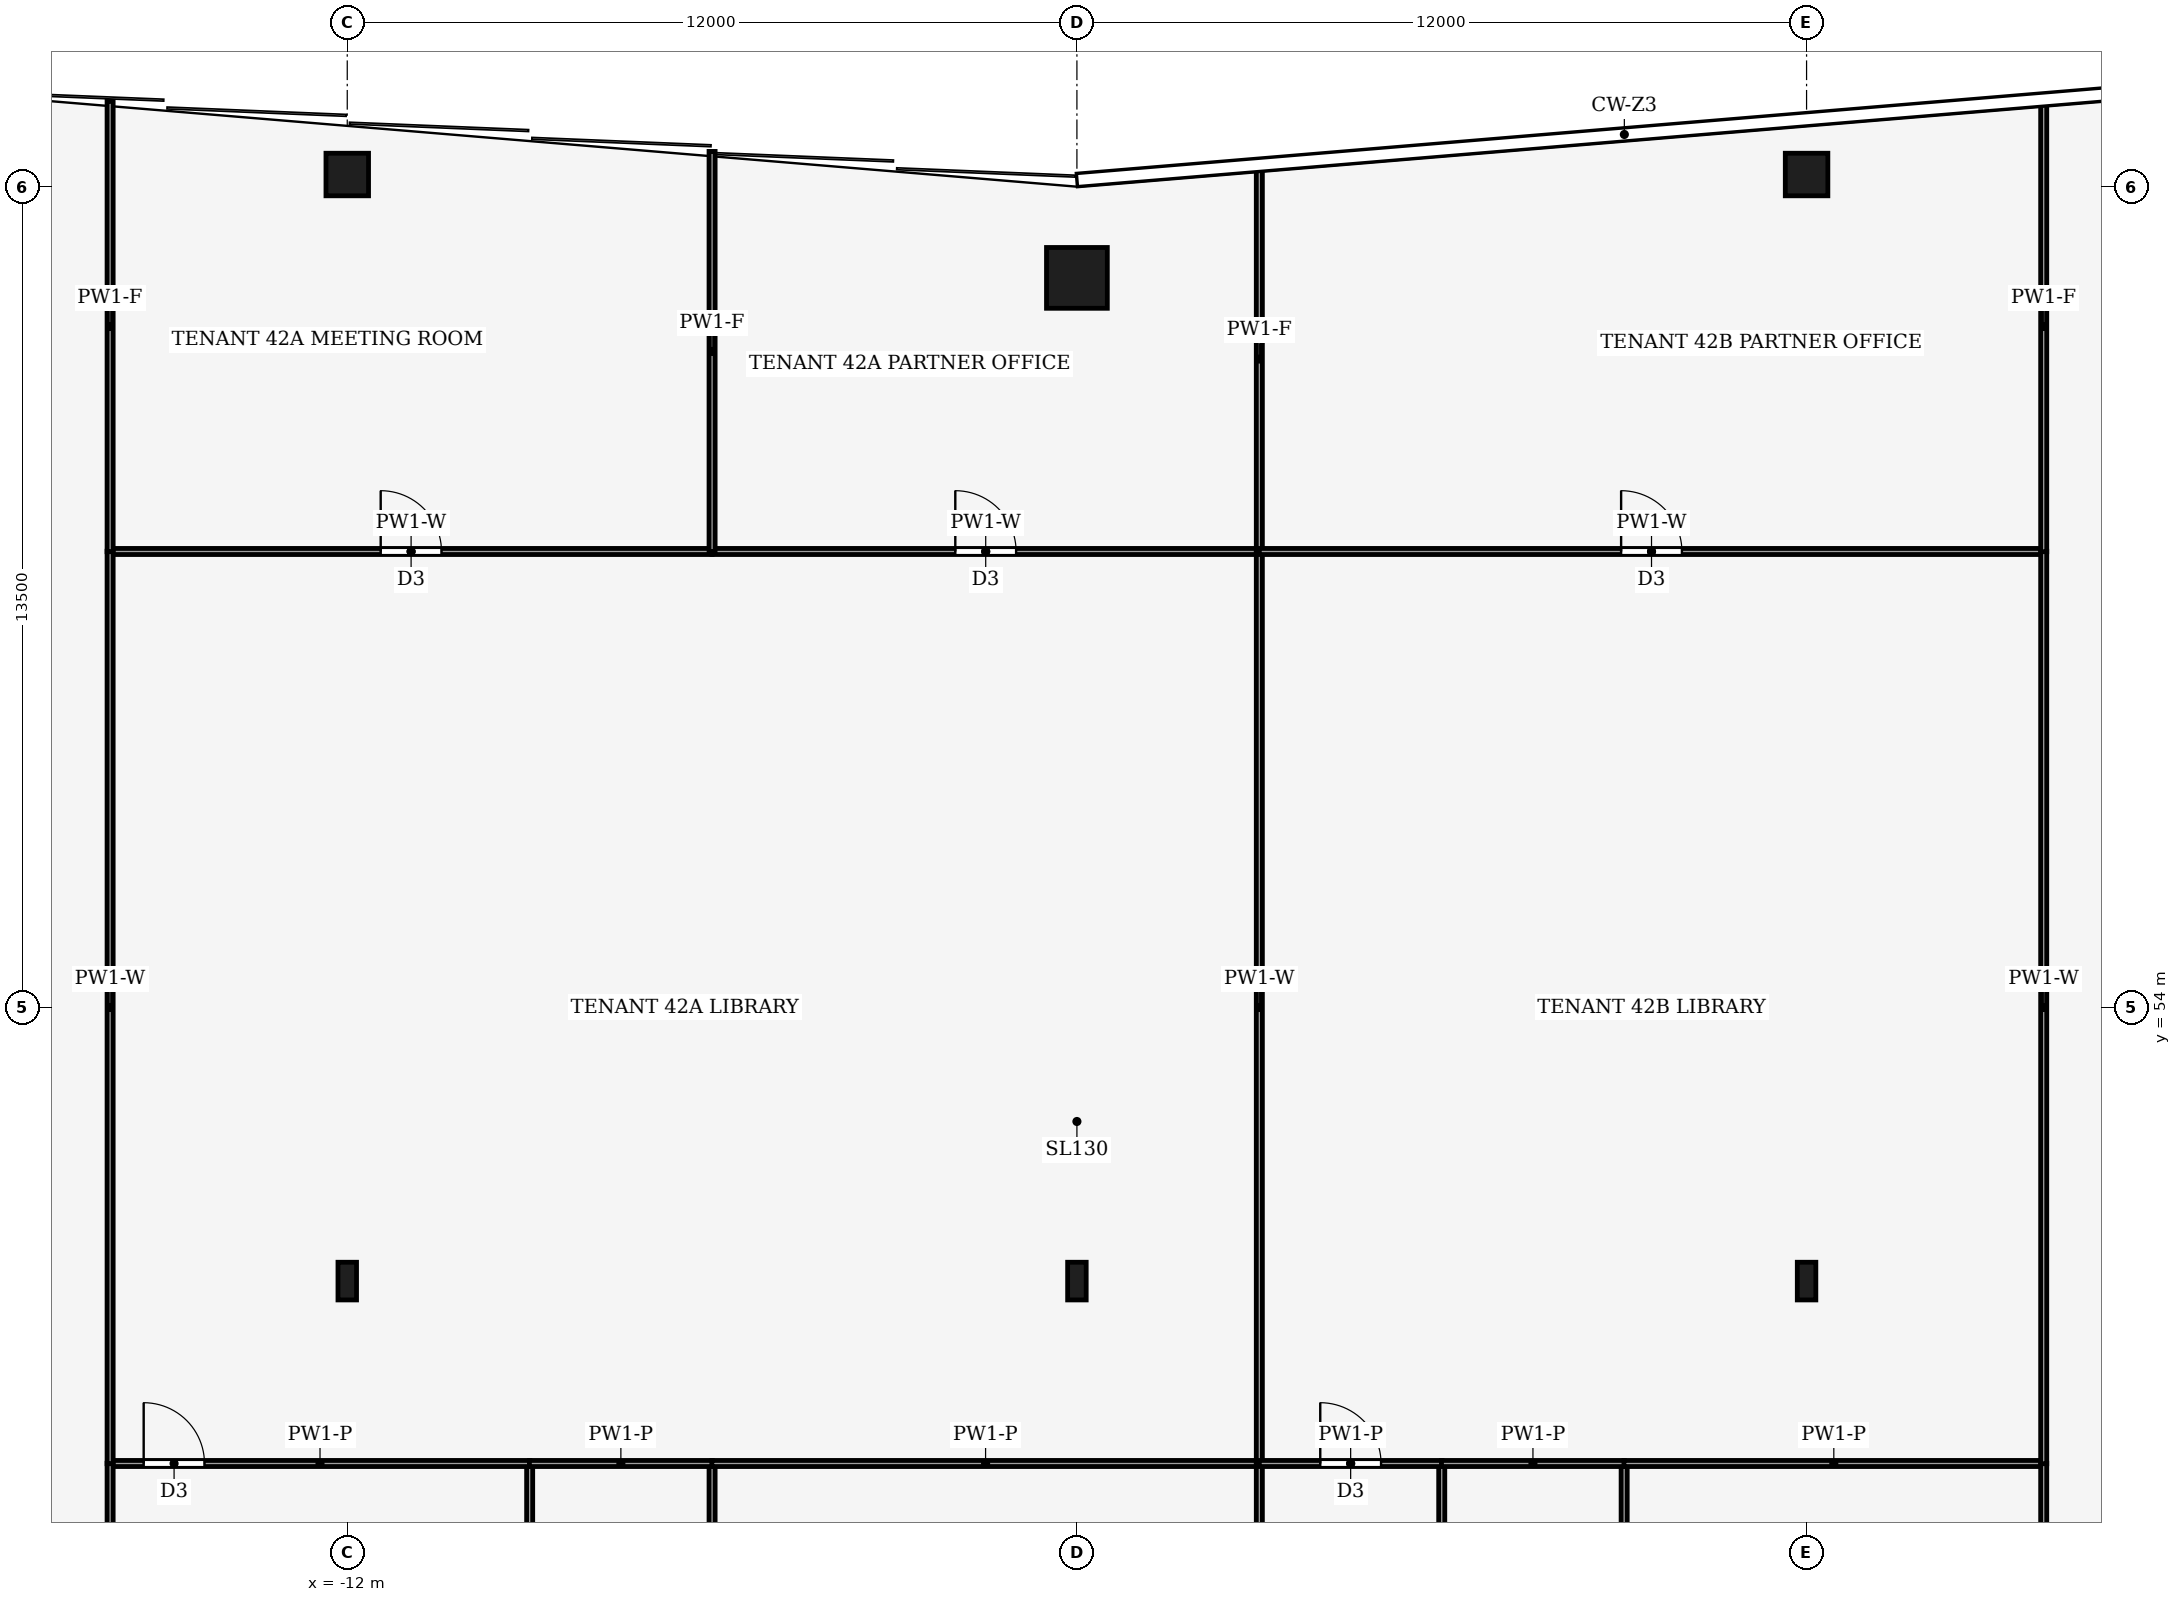
"""IFC4 building model, lengths in metres.
Left out: names, types, materials, properties, quantities, classifications, styles, units other than length and angle.
Written with IfcOpenShell. Run it as: python <this file> out.ifc"""

import sys

from ifc_helpers import new_model, si_unit, direction, frame, frame_2d, origin, origin_2d, place, context, subcontext, project, spatial, rectangle, hollow_rectangle, i_section, extrude, element, fill, save


model = new_model("IFC4")
c1 = context("Model", 3, precision=1e-05, world=origin(), true_north=direction((0.0, 1.0)))
c2 = subcontext(c1, "Body", "Model", "MODEL_VIEW")
j1 = project(units=[si_unit("LENGTHUNIT", "METRE"), si_unit("PLANEANGLEUNIT", "RADIAN")], contexts=[c1])
p1 = place(None, origin())
s1 = spatial("IfcSite", under=j1, at=p1, CompositionType="ELEMENT")
p2 = place(p1, origin())
s2 = spatial("IfcBuilding", under=s1, at=p2, CompositionType="ELEMENT")
p3 = place(p2, frame((0.0, 0.0, 186.0)))
s3 = spatial("IfcBuildingStorey", under=s2, at=p3, CompositionType="ELEMENT", Elevation=186.0)
p4 = place(p3, frame((0.0, 66.0, 0.0), z_axis=(0.0, 0.0, 1.0), x_axis=(1.0, 0.0, 0.0)))
e1 = element("IfcColumn", 1, at=p4, inside=s3, PredefinedType="COLUMN", context=c2, shape_type="SweptSolid", body=[
    extrude(hollow_rectangle(XDim=1.0, YDim=1.0, WallThickness=0.06, at=origin_2d()), origin(), (0.0, 0.0, 1.0), 4.0),
])
for number, where, z_axis, x_axis in (
    (2, (-12.0, 67.7, 0.0), (0.0, 0.0, 1.0), (1.0, 0.0, 0.0)),
    (3, (12.0, 67.7, 0.0), (0.0, 0.0, 1.0), (1.0, 0.0, 0.0)),
):
    element("IfcColumn", number, at=place(p3, frame(where, z_axis=z_axis, x_axis=x_axis)), inside=s3, PredefinedType="COLUMN", context=c2, shape_type="SweptSolid", body=[
        extrude(hollow_rectangle(XDim=0.7, YDim=0.7, WallThickness=0.03, at=origin_2d()), origin(), (0.0, 0.0, 1.0), 4.0),
    ])
for number, where, z_axis, x_axis in (
    (4, (-12.0, 49.5, 0.0), (0.0, 0.0, 1.0), (1.0, 0.0, 0.0)),
    (5, (0.0, 49.5, 0.0), (0.0, 0.0, 1.0), (1.0, 0.0, 0.0)),
    (6, (12.0, 49.5, 0.0), (0.0, 0.0, 1.0), (1.0, 0.0, 0.0)),
):
    element("IfcColumn", number, at=place(p3, frame(where, z_axis=z_axis, x_axis=x_axis)), inside=s3, PredefinedType="COLUMN", context=c2, shape_type="SweptSolid", body=[
        extrude(i_section(OverallWidth=0.305, OverallDepth=0.62, WebThickness=0.021, FlangeThickness=0.04, FilletRadius=0.027, at=origin_2d()), origin(), (0.0, 0.0, 1.0), 4.0),
    ])
p5 = place(p3, frame((-9.0, 46.5, 0.0), z_axis=(0.0, 0.0, 1.0), x_axis=(0.0, -1.0, 0.0)))
e7 = element("IfcWall", 7, at=p5, inside=s3, PredefinedType="PARTITIONING", context=c2, shape_type="SweptSolid", body=[
    extrude(rectangle(XDim=5.6, YDim=0.1, at=frame_2d((2.8, 0.0))), origin(), (0.0, 0.0, 1.0), 3.87),
])
p6 = place(p5, frame((2.3, 0.0, 0.0)))
e8 = element("IfcOpeningElement", 8, at=p6, cuts=e7, PredefinedType="OPENING", context=c2, shape_type="SweptSolid", body=[
    extrude(rectangle(XDim=1.0, YDim=2.1, at=frame_2d((0.5, 1.05))), frame((0.0, 0.06, 0.0), z_axis=(0.0, -1.0, 0.0), x_axis=(1.0, 0.0, 0.0)), (0.0, 0.0, 1.0), 0.12),
])
p7 = place(p3, frame((-15.9, 46.5, 0.0), z_axis=(0.0, 0.0, 1.0), x_axis=(1.0, 0.0, 0.0)))
e9 = element("IfcWall", 9, at=p7, inside=s3, PredefinedType="PARTITIONING", context=c2, shape_type="SweptSolid", body=[
    extrude(rectangle(XDim=6.904, YDim=0.1, at=frame_2d((3.452, 0.0))), origin(), (0.0, 0.0, 1.0), 3.44),
])
p8 = place(p7, frame((0.552, 0.0, 0.0)))
e10 = element("IfcOpeningElement", 10, at=p8, cuts=e9, PredefinedType="OPENING", context=c2, shape_type="SweptSolid", body=[
    extrude(rectangle(XDim=1.0, YDim=2.1, at=frame_2d((0.5, 1.05))), frame((0.0, 0.06, 0.0), z_axis=(0.0, -1.0, 0.0), x_axis=(1.0, 0.0, 0.0)), (0.0, 0.0, 1.0), 0.12),
])
p9 = place(p3, frame((-15.9, 46.504, 0.0), z_axis=(0.0, 0.0, 1.0), x_axis=(0.0, -1.0, 0.0)))
e11 = element("IfcWall", 11, at=p9, inside=s3, PredefinedType="PARTITIONING", context=c2, shape_type="SweptSolid", body=[
    extrude(rectangle(XDim=5.608, YDim=0.1, at=frame_2d((2.804, 0.0))), origin(), (0.0, 0.0, 1.0), 3.44),
])
p10 = place(p3, frame((-6.0, 40.9, 0.0), z_axis=(0.0, 0.0, 1.0), x_axis=(0.0, 1.0, 0.0)))
e12 = element("IfcWall", 12, at=p10, inside=s3, PredefinedType="PARTITIONING", context=c2, shape_type="SweptSolid", body=[
    extrude(rectangle(XDim=5.6, YDim=0.1, at=frame_2d((2.8, 0.0))), origin(), (0.0, 0.0, 1.0), 3.87),
])
p11 = place(p3, frame((-5.996, 46.5, 0.0), z_axis=(0.0, 0.0, 1.0), x_axis=(-1.0, 0.0, 0.0)))
e13 = element("IfcWall", 13, at=p11, inside=s3, PredefinedType="PARTITIONING", context=c2, shape_type="SweptSolid", body=[
    extrude(rectangle(XDim=3.008, YDim=0.1, at=frame_2d((1.504, 0.0))), origin(), (0.0, 0.0, 1.0), 3.44),
])
p12 = place(p3, frame((3.0, 46.5, 0.0), z_axis=(0.0, 0.0, 1.0), x_axis=(-1.0, 0.0, 0.0)))
e14 = element("IfcWall", 14, at=p12, inside=s3, PredefinedType="PARTITIONING", context=c2, shape_type="SweptSolid", body=[
    extrude(rectangle(XDim=9.004, YDim=0.1, at=frame_2d((4.502, 0.0))), origin(), (0.0, 0.0, 1.0), 3.44),
])
p13 = place(p3, frame((3.0, 40.9, 0.0), z_axis=(0.0, 0.0, 1.0), x_axis=(0.0, 1.0, 0.0)))
e15 = element("IfcWall", 15, at=p13, inside=s3, PredefinedType="PARTITIONING", context=c2, shape_type="SweptSolid", body=[
    extrude(rectangle(XDim=5.6, YDim=0.1, at=frame_2d((2.8, 0.0))), origin(), (0.0, 0.0, 1.0), 3.87),
])
p14 = place(p3, frame((-15.9, 61.5, 0.0), z_axis=(0.0, 0.0, 1.0), x_axis=(1.0, 0.0, 0.0)))
e16 = element("IfcWall", 16, at=p14, inside=s3, PredefinedType="PARTITIONING", context=c2, shape_type="SweptSolid", body=[
    extrude(rectangle(XDim=9.9, YDim=0.1, at=frame_2d((4.95, 0.0))), origin(), (0.0, 0.0, 1.0), 3.24),
])
p15 = place(p14, frame((4.45, 0.0, 0.0)))
e17 = element("IfcOpeningElement", 17, at=p15, cuts=e16, PredefinedType="OPENING", context=c2, shape_type="SweptSolid", body=[
    extrude(rectangle(XDim=1.0, YDim=2.1, at=frame_2d((0.5, 1.05))), frame((0.0, 0.06, 0.0), z_axis=(0.0, -1.0, 0.0), x_axis=(1.0, 0.0, 0.0)), (0.0, 0.0, 1.0), 0.12),
])
p16 = place(p3, frame((-6.0, 61.5, 0.0), z_axis=(0.0, 0.0, 1.0), x_axis=(1.0, 0.0, 0.0)))
e18 = element("IfcWall", 18, at=p16, inside=s3, PredefinedType="PARTITIONING", context=c2, shape_type="SweptSolid", body=[
    extrude(rectangle(XDim=9.0, YDim=0.1, at=frame_2d((4.5, 0.0))), origin(), (0.0, 0.0, 1.0), 3.24),
])
p17 = place(p16, frame((4.0, 0.0, 0.0)))
e19 = element("IfcOpeningElement", 19, at=p17, cuts=e18, PredefinedType="OPENING", context=c2, shape_type="SweptSolid", body=[
    extrude(rectangle(XDim=1.0, YDim=2.1, at=frame_2d((0.5, 1.05))), frame((0.0, 0.06, 0.0), z_axis=(0.0, -1.0, 0.0), x_axis=(1.0, 0.0, 0.0)), (0.0, 0.0, 1.0), 0.12),
])
p18 = place(p3, frame((3.0, 46.5, 0.0), z_axis=(0.0, 0.0, 1.0), x_axis=(0.0, 1.0, 0.0)))
e20 = element("IfcWall", 20, at=p18, inside=s3, PredefinedType="PARTITIONING", context=c2, shape_type="SweptSolid", body=[
    extrude(rectangle(XDim=15.0, YDim=0.1, at=frame_2d((7.5, 0.0))), origin(), (0.0, 0.0, 1.0), 3.24),
])
p19 = place(p3, frame((-15.9, 61.504, 0.0), z_axis=(0.0, 0.0, 1.0), x_axis=(0.0, -1.0, 0.0)))
e21 = element("IfcWall", 21, at=p19, inside=s3, PredefinedType="PARTITIONING", context=c2, shape_type="SweptSolid", body=[
    extrude(rectangle(XDim=15.008, YDim=0.1, at=frame_2d((7.504, 0.0))), origin(), (0.0, 0.0, 1.0), 3.24),
])
p20 = place(p3, frame((-6.0, 61.5, 0.0), z_axis=(0.0, 0.0, 1.0), x_axis=(0.0, 1.0, 0.0)))
e22 = element("IfcWall", 22, at=p20, inside=s3, PredefinedType="PARTITIONING", context=c2, shape_type="SweptSolid", body=[
    extrude(rectangle(XDim=6.58, YDim=0.1, at=frame_2d((3.29, 0.0))), origin(), (0.0, 0.0, 1.0), 3.04),
])
p21 = place(p3, frame((-15.9, 68.905, 0.0), z_axis=(0.0, 0.0, 1.0), x_axis=(0.0, -1.0, 0.0)))
e23 = element("IfcWall", 23, at=p21, inside=s3, PredefinedType="PARTITIONING", context=c2, shape_type="SweptSolid", body=[
    extrude(rectangle(XDim=7.409, YDim=0.1, at=frame_2d((3.705, 0.0))), origin(), (0.0, 0.0, 1.0), 3.04),
])
p22 = place(p3, frame((3.0, 61.5, 0.0), z_axis=(0.0, 0.0, 1.0), x_axis=(0.0, 1.0, 0.0)))
e24 = element("IfcWall", 24, at=p22, inside=s3, PredefinedType="PARTITIONING", context=c2, shape_type="SweptSolid", body=[
    extrude(rectangle(XDim=6.33, YDim=0.1, at=frame_2d((3.165, 0.0))), origin(), (0.0, 0.0, 1.0), 3.04),
])
p23 = place(p3, frame((6.0, 46.5, 0.0), z_axis=(0.0, 0.0, 1.0), x_axis=(0.0, -1.0, 0.0)))
e25 = element("IfcWall", 25, at=p23, inside=s3, PredefinedType="PARTITIONING", context=c2, shape_type="SweptSolid", body=[
    extrude(rectangle(XDim=5.6, YDim=0.1, at=frame_2d((2.8, 0.0))), origin(), (0.0, 0.0, 1.0), 3.87),
])
p24 = place(p23, frame((2.3, 0.0, 0.0)))
e26 = element("IfcOpeningElement", 26, at=p24, cuts=e25, PredefinedType="OPENING", context=c2, shape_type="SweptSolid", body=[
    extrude(rectangle(XDim=1.0, YDim=2.1, at=frame_2d((0.5, 1.05))), frame((0.0, 0.06, 0.0), z_axis=(0.0, -1.0, 0.0), x_axis=(1.0, 0.0, 0.0)), (0.0, 0.0, 1.0), 0.12),
])
p25 = place(p3, frame((3.0, 46.5, 0.0), z_axis=(0.0, 0.0, 1.0), x_axis=(1.0, 0.0, 0.0)))
e27 = element("IfcWall", 27, at=p25, inside=s3, PredefinedType="PARTITIONING", context=c2, shape_type="SweptSolid", body=[
    extrude(rectangle(XDim=3.004, YDim=0.1, at=frame_2d((1.502, 0.0))), origin(), (0.0, 0.0, 1.0), 3.44),
])
p26 = place(p25, frame((1.002, 0.0, 0.0)))
e28 = element("IfcOpeningElement", 28, at=p26, cuts=e27, PredefinedType="OPENING", context=c2, shape_type="SweptSolid", body=[
    extrude(rectangle(XDim=1.0, YDim=2.1, at=frame_2d((0.5, 1.05))), frame((0.0, 0.06, 0.0), z_axis=(0.0, -1.0, 0.0), x_axis=(1.0, 0.0, 0.0)), (0.0, 0.0, 1.0), 0.12),
])
p27 = place(p3, frame((9.0, 40.9, 0.0), z_axis=(0.0, 0.0, 1.0), x_axis=(0.0, 1.0, 0.0)))
e29 = element("IfcWall", 29, at=p27, inside=s3, PredefinedType="PARTITIONING", context=c2, shape_type="SweptSolid", body=[
    extrude(rectangle(XDim=5.6, YDim=0.1, at=frame_2d((2.8, 0.0))), origin(), (0.0, 0.0, 1.0), 3.87),
])
p28 = place(p3, frame((9.004, 46.5, 0.0), z_axis=(0.0, 0.0, 1.0), x_axis=(-1.0, 0.0, 0.0)))
e30 = element("IfcWall", 30, at=p28, inside=s3, PredefinedType="PARTITIONING", context=c2, shape_type="SweptSolid", body=[
    extrude(rectangle(XDim=3.008, YDim=0.1, at=frame_2d((1.504, 0.0))), origin(), (0.0, 0.0, 1.0), 3.44),
])
p29 = place(p3, frame((15.9, 46.5, 0.0), z_axis=(0.0, 0.0, 1.0), x_axis=(-1.0, 0.0, 0.0)))
e31 = element("IfcWall", 31, at=p29, inside=s3, PredefinedType="PARTITIONING", context=c2, shape_type="SweptSolid", body=[
    extrude(rectangle(XDim=6.904, YDim=0.1, at=frame_2d((3.452, 0.0))), origin(), (0.0, 0.0, 1.0), 3.44),
])
p30 = place(p3, frame((15.9, 40.896, 0.0), z_axis=(0.0, 0.0, 1.0), x_axis=(0.0, 1.0, 0.0)))
e32 = element("IfcWall", 32, at=p30, inside=s3, PredefinedType="PARTITIONING", context=c2, shape_type="SweptSolid", body=[
    extrude(rectangle(XDim=5.608, YDim=0.1, at=frame_2d((2.804, 0.0))), origin(), (0.0, 0.0, 1.0), 3.44),
])
p31 = place(p3, frame((3.0, 61.5, 0.0), z_axis=(0.0, 0.0, 1.0), x_axis=(1.0, 0.0, 0.0)))
e33 = element("IfcWall", 33, at=p31, inside=s3, PredefinedType="PARTITIONING", context=c2, shape_type="SweptSolid", body=[
    extrude(rectangle(XDim=12.9, YDim=0.1, at=frame_2d((6.45, 0.0))), origin(), (0.0, 0.0, 1.0), 3.24),
])
p32 = place(p31, frame((5.95, 0.0, 0.0)))
e34 = element("IfcOpeningElement", 34, at=p32, cuts=e33, PredefinedType="OPENING", context=c2, shape_type="SweptSolid", body=[
    extrude(rectangle(XDim=1.0, YDim=2.1, at=frame_2d((0.5, 1.05))), frame((0.0, 0.06, 0.0), z_axis=(0.0, -1.0, 0.0), x_axis=(1.0, 0.0, 0.0)), (0.0, 0.0, 1.0), 0.12),
])
p33 = place(p3, frame((15.9, 46.496, 0.0), z_axis=(0.0, 0.0, 1.0), x_axis=(0.0, 1.0, 0.0)))
e35 = element("IfcWall", 35, at=p33, inside=s3, PredefinedType="PARTITIONING", context=c2, shape_type="SweptSolid", body=[
    extrude(rectangle(XDim=15.008, YDim=0.1, at=frame_2d((7.504, 0.0))), origin(), (0.0, 0.0, 1.0), 3.24),
])
p34 = place(p3, frame((15.9, 61.496, 0.0), z_axis=(0.0, 0.0, 1.0), x_axis=(0.0, 1.0, 0.0)))
e36 = element("IfcWall", 36, at=p34, inside=s3, PredefinedType="PARTITIONING", context=c2, shape_type="SweptSolid", body=[
    extrude(rectangle(XDim=7.409, YDim=0.1, at=frame_2d((3.705, 0.0))), origin(), (0.0, 0.0, 1.0), 3.04),
])
p35 = place(p8, origin())
e37 = element("IfcDoor", 37, at=p35, inside=s3, OperationType="SINGLE_SWING_LEFT", PredefinedType="DOOR", context=c2, shape_type="SweptSolid", body=[
    extrude(rectangle(XDim=1.0, YDim=2.1, at=frame_2d((0.5, 1.05))), frame((0.0, 0.025, 0.0), z_axis=(0.0, -1.0, 0.0), x_axis=(1.0, 0.0, 0.0)), (0.0, 0.0, 1.0), 0.05),
])
fill(e10, e37)
p36 = place(p15, origin())
e38 = element("IfcDoor", 38, at=p36, inside=s3, OperationType="SINGLE_SWING_RIGHT", PredefinedType="DOOR", context=c2, shape_type="SweptSolid", body=[
    extrude(rectangle(XDim=1.0, YDim=2.1, at=frame_2d((0.5, 1.05))), frame((0.0, 0.025, 0.0), z_axis=(0.0, -1.0, 0.0), x_axis=(1.0, 0.0, 0.0)), (0.0, 0.0, 1.0), 0.05),
])
fill(e17, e38)
p37 = place(p17, origin())
e39 = element("IfcDoor", 39, at=p37, inside=s3, OperationType="SINGLE_SWING_LEFT", PredefinedType="DOOR", context=c2, shape_type="SweptSolid", body=[
    extrude(rectangle(XDim=1.0, YDim=2.1, at=frame_2d((0.5, 1.05))), frame((0.0, 0.025, 0.0), z_axis=(0.0, -1.0, 0.0), x_axis=(1.0, 0.0, 0.0)), (0.0, 0.0, 1.0), 0.05),
])
fill(e19, e39)
p38 = place(p26, origin())
e40 = element("IfcDoor", 40, at=p38, inside=s3, OperationType="SINGLE_SWING_LEFT", PredefinedType="DOOR", context=c2, shape_type="SweptSolid", body=[
    extrude(rectangle(XDim=1.0, YDim=2.1, at=frame_2d((0.5, 1.05))), frame((0.0, 0.025, 0.0), z_axis=(0.0, -1.0, 0.0), x_axis=(1.0, 0.0, 0.0)), (0.0, 0.0, 1.0), 0.05),
])
fill(e28, e40)
p39 = place(p32, origin())
e41 = element("IfcDoor", 41, at=p39, inside=s3, OperationType="SINGLE_SWING_RIGHT", PredefinedType="DOOR", context=c2, shape_type="SweptSolid", body=[
    extrude(rectangle(XDim=1.0, YDim=2.1, at=frame_2d((0.5, 1.05))), frame((0.0, 0.025, 0.0), z_axis=(0.0, -1.0, 0.0), x_axis=(1.0, 0.0, 0.0)), (0.0, 0.0, 1.0), 0.05),
])
fill(e34, e41)
save(model, sys.argv[1])
